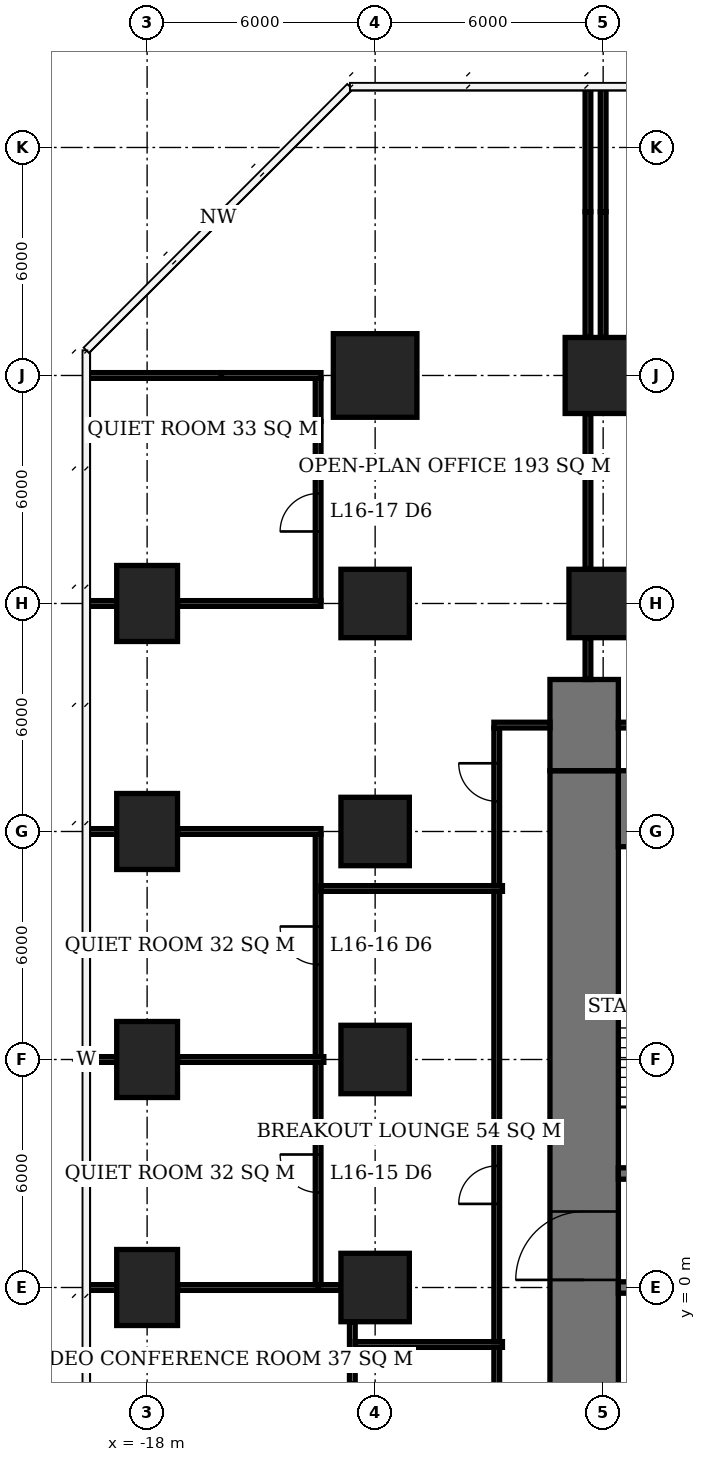
"""IFC4 building model, lengths in metres.
Left out: names, types, materials, properties, quantities, classifications, styles, units other than length and angle.
Written with IfcOpenShell. Run it as: python <this file> out.ifc"""

import sys

from ifc_helpers import new_model, si_unit, direction, frame, frame_2d, origin, origin_2d, place, context, subcontext, project, spatial, rectangle, extrude, element, fill, save


model = new_model("IFC4")
c1 = context("Model", 3, precision=1e-05, world=origin(), true_north=direction((0.0, 1.0)))
c2 = subcontext(c1, "Body", "Model", "MODEL_VIEW")
j1 = project(units=[si_unit("LENGTHUNIT", "METRE"), si_unit("PLANEANGLEUNIT", "RADIAN")], contexts=[c1])
p1 = place(None, origin())
s1 = spatial("IfcSite", under=j1, at=p1, CompositionType="ELEMENT")
p2 = place(p1, origin())
s2 = spatial("IfcBuilding", under=s1, at=p2, CompositionType="ELEMENT")
p3 = place(p2, frame((0.0, 0.0, 68.9)))
s3 = spatial("IfcBuildingStorey", under=s2, at=p3, CompositionType="ELEMENT", Elevation=68.9)
for number, where, z_axis, x_axis in (
    (1, (-18.0, 0.0, 0.0), (0.0, 0.0, 1.0), (0.0, 1.0, 0.0)),
    (2, (-18.0, 6.0, 0.0), (0.0, 0.0, 1.0), (0.0, 1.0, 0.0)),
    (3, (-18.0, 12.0, 0.0), (0.0, 0.0, 1.0), (0.0, 1.0, 0.0)),
    (4, (-18.0, 18.0, 0.0), (0.0, 0.0, 1.0), (0.0, 1.0, 0.0)),
):
    element("IfcColumn", number, at=place(p3, frame(where, z_axis=z_axis, x_axis=x_axis)), inside=s3, PredefinedType="COLUMN", context=c2, shape_type="SweptSolid", body=[
        extrude(rectangle(XDim=2.0, YDim=1.6, at=origin_2d()), origin(), (0.0, 0.0, 1.0), 3.9),
    ])
for number, where, z_axis, x_axis in (
    (5, (-12.0, 0.0, 0.0), (0.0, 0.0, 1.0), (1.0, 0.0, 0.0)),
    (6, (-12.0, 6.0, 0.0), (0.0, 0.0, 1.0), (1.0, 0.0, 0.0)),
    (7, (-12.0, 12.0, 0.0), (0.0, 0.0, 1.0), (1.0, 0.0, 0.0)),
    (8, (-12.0, 18.0, 0.0), (0.0, 0.0, 1.0), (1.0, 0.0, 0.0)),
):
    element("IfcColumn", number, at=place(p3, frame(where, z_axis=z_axis, x_axis=x_axis)), inside=s3, PredefinedType="COLUMN", context=c2, shape_type="SweptSolid", body=[
        extrude(rectangle(XDim=1.8, YDim=1.8, at=origin_2d()), origin(), (0.0, 0.0, 1.0), 3.9),
    ])
p4 = place(p3, frame((-12.0, 24.0, 0.0), z_axis=(0.0, 0.0, 1.0), x_axis=(1.0, 0.0, 0.0)))
e9 = element("IfcColumn", 9, at=p4, inside=s3, PredefinedType="COLUMN", context=c2, shape_type="SweptSolid", body=[
    extrude(rectangle(XDim=2.2, YDim=2.2, at=origin_2d()), origin(), (0.0, 0.0, 1.0), 3.9),
])
p5 = place(p3, frame((-6.0, 18.0, 0.0), z_axis=(0.0, 0.0, 1.0), x_axis=(1.0, 0.0, 0.0)))
e10 = element("IfcColumn", 10, at=p5, inside=s3, PredefinedType="COLUMN", context=c2, shape_type="SweptSolid", body=[
    extrude(rectangle(XDim=1.8, YDim=1.8, at=origin_2d()), origin(), (0.0, 0.0, 1.0), 3.9),
])
p6 = place(p3, frame((-6.0, 24.0, 0.0), z_axis=(0.0, 0.0, 1.0), x_axis=(1.0, 0.0, 0.0)))
e11 = element("IfcColumn", 11, at=p6, inside=s3, PredefinedType="COLUMN", context=c2, shape_type="SweptSolid", body=[
    extrude(rectangle(XDim=2.0, YDim=2.0, at=origin_2d()), origin(), (0.0, 0.0, 1.0), 3.9),
])
p7 = place(p3, frame((-5.6, 12.6, 0.0), z_axis=(0.0, 0.0, 1.0), x_axis=(1.0, 0.0, 0.0)))
e12 = element("IfcWall", 12, at=p7, inside=s3, PredefinedType="SHEAR", context=c2, shape_type="SweptSolid", body=[
    extrude(rectangle(XDim=23.2, YDim=2.0, at=frame_2d((11.6, 0.0))), origin(), (0.0, 0.0, 1.0), 3.9),
])
p8 = place(p3, frame((-6.5, -7.6, 0.0), z_axis=(0.0, 0.0, 1.0), x_axis=(0.0, 1.0, 0.0)))
e13 = element("IfcWall", 13, at=p8, inside=s3, PredefinedType="SHEAR", context=c2, shape_type="SweptSolid", body=[
    extrude(rectangle(XDim=21.2, YDim=1.8, at=frame_2d((10.6, 0.0))), origin(), (0.0, 0.0, 1.0), 3.9),
])
p9 = place(p8, frame((7.8, 0.0, 0.0)))
e14 = element("IfcOpeningElement", 14, at=p9, cuts=e13, PredefinedType="OPENING", context=c2, shape_type="SweptSolid", body=[
    extrude(rectangle(XDim=1.8, YDim=2.4, at=frame_2d((0.9, 1.2))), frame((0.0, 0.91, 0.0), z_axis=(0.0, -1.0, 0.0), x_axis=(1.0, 0.0, 0.0)), (0.0, 0.0, 1.0), 1.82),
])
p10 = place(p3, frame((-6.5, 13.6, 0.0), z_axis=(0.0, 0.0, 1.0), x_axis=(0.0, 1.0, 0.0)))
e15 = element("IfcWall", 15, at=p10, inside=s3, PredefinedType="SHEAR", context=c2, shape_type="SweptSolid", body=[
    extrude(rectangle(XDim=2.4, YDim=1.8, at=frame_2d((1.2, 0.0))), origin(), (0.0, 0.0, 1.0), 3.9),
])
p11 = place(p3, frame((-5.6, 0.0, 0.0), z_axis=(0.0, 0.0, 1.0), x_axis=(1.0, 0.0, 0.0)))
e16 = element("IfcWall", 16, at=p11, inside=s3, PredefinedType="SHEAR", context=c2, shape_type="SweptSolid", body=[
    extrude(rectangle(XDim=17.75, YDim=0.3, at=frame_2d((8.875, 0.0))), origin(), (0.0, 0.0, 1.0), 3.9),
])
p12 = place(p11, frame((0.6, 0.0, 0.0)))
e17 = element("IfcOpeningElement", 17, at=p12, cuts=e16, PredefinedType="OPENING", context=c2, shape_type="SweptSolid", body=[
    extrude(rectangle(XDim=0.9, YDim=2.1, at=frame_2d((0.45, 1.05))), frame((0.0, 0.16, 0.0), z_axis=(0.0, -1.0, 0.0), x_axis=(1.0, 0.0, 0.0)), (0.0, 0.0, 1.0), 0.32),
])
p13 = place(p11, frame((3.7, 0.0, 0.0)))
e18 = element("IfcOpeningElement", 18, at=p13, cuts=e16, PredefinedType="OPENING", context=c2, shape_type="SweptSolid", body=[
    extrude(rectangle(XDim=1.0, YDim=2.1, at=frame_2d((0.5, 1.05))), frame((0.0, 0.16, 0.0), z_axis=(0.0, -1.0, 0.0), x_axis=(1.0, 0.0, 0.0)), (0.0, 0.0, 1.0), 0.32),
])
p14 = place(p3, frame((-5.6, 3.0, 0.0), z_axis=(0.0, 0.0, 1.0), x_axis=(1.0, 0.0, 0.0)))
e19 = element("IfcWall", 19, at=p14, inside=s3, PredefinedType="SHEAR", context=c2, shape_type="SweptSolid", body=[
    extrude(rectangle(XDim=5.45, YDim=0.3, at=frame_2d((2.725, 0.0))), origin(), (0.0, 0.0, 1.0), 3.9),
])
p15 = place(p14, frame((0.4, 0.0, 0.0)))
e20 = element("IfcOpeningElement", 20, at=p15, cuts=e19, PredefinedType="OPENING", context=c2, shape_type="SweptSolid", body=[
    extrude(rectangle(XDim=1.2, YDim=2.1, at=frame_2d((0.6, 1.05))), frame((0.0, 0.16, 0.0), z_axis=(0.0, -1.0, 0.0), x_axis=(1.0, 0.0, 0.0)), (0.0, 0.0, 1.0), 0.32),
])
p16 = place(p14, frame((3.95, 0.0, 0.0)))
e21 = element("IfcOpeningElement", 21, at=p16, cuts=e19, PredefinedType="OPENING", context=c2, shape_type="SweptSolid", body=[
    extrude(rectangle(XDim=0.9, YDim=2.1, at=frame_2d((0.45, 1.05))), frame((0.0, 0.16, 0.0), z_axis=(0.0, -1.0, 0.0), x_axis=(1.0, 0.0, 0.0)), (0.0, 0.0, 1.0), 0.32),
])
p17 = place(p3, frame((-19.6, 0.0, 0.0), z_axis=(0.0, 0.0, 1.0), x_axis=(1.0, 0.0, 0.0)))
e22 = element("IfcWall", 22, at=p17, inside=s3, PredefinedType="PARTITIONING", context=c2, shape_type="SweptSolid", body=[
    extrude(rectangle(XDim=0.8, YDim=0.15, at=frame_2d((0.4, 0.0))), origin(), (0.0, 0.0, 1.0), 3.65),
])
p18 = place(p3, frame((-17.2, 0.0, 0.0), z_axis=(0.0, 0.0, 1.0), x_axis=(1.0, 0.0, 0.0)))
e23 = element("IfcWall", 23, at=p18, inside=s3, PredefinedType="PARTITIONING", context=c2, shape_type="SweptSolid", body=[
    extrude(rectangle(XDim=3.775, YDim=0.15, at=frame_2d((1.887, 0.0))), origin(), (0.0, 0.0, 1.0), 3.65),
])
p19 = place(p3, frame((-13.5, 0.0, 0.0), z_axis=(0.0, 0.0, 1.0), x_axis=(1.0, 0.0, 0.0)))
e24 = element("IfcWall", 24, at=p19, inside=s3, PredefinedType="PARTITIONING", context=c2, shape_type="SweptSolid", body=[
    extrude(rectangle(XDim=0.6, YDim=0.15, at=frame_2d((0.3, 0.0))), origin(), (0.0, 0.0, 1.0), 3.65),
])
p20 = place(p3, frame((-19.55, 6.0, 0.0), z_axis=(0.0, 0.0, 1.0), x_axis=(1.0, 0.0, 0.0)))
e25 = element("IfcWall", 25, at=p20, inside=s3, PredefinedType="PARTITIONING", context=c2, shape_type="SweptSolid", body=[
    extrude(rectangle(XDim=0.75, YDim=0.15, at=frame_2d((0.375, 0.0))), origin(), (0.0, 0.0, 1.0), 3.65),
])
p21 = place(p3, frame((-17.2, 6.0, 0.0), z_axis=(0.0, 0.0, 1.0), x_axis=(1.0, 0.0, 0.0)))
e26 = element("IfcWall", 26, at=p21, inside=s3, PredefinedType="PARTITIONING", context=c2, shape_type="SweptSolid", body=[
    extrude(rectangle(XDim=3.85, YDim=0.15, at=frame_2d((1.925, 0.0))), origin(), (0.0, 0.0, 1.0), 3.65),
])
p22 = place(p3, frame((-19.6, 12.0, 0.0), z_axis=(0.0, 0.0, 1.0), x_axis=(1.0, 0.0, 0.0)))
e27 = element("IfcWall", 27, at=p22, inside=s3, PredefinedType="PARTITIONING", context=c2, shape_type="SweptSolid", body=[
    extrude(rectangle(XDim=0.8, YDim=0.15, at=frame_2d((0.4, 0.0))), origin(), (0.0, 0.0, 1.0), 3.65),
])
p23 = place(p3, frame((-17.2, 12.0, 0.0), z_axis=(0.0, 0.0, 1.0), x_axis=(1.0, 0.0, 0.0)))
e28 = element("IfcWall", 28, at=p23, inside=s3, PredefinedType="PARTITIONING", context=c2, shape_type="SweptSolid", body=[
    extrude(rectangle(XDim=3.775, YDim=0.15, at=frame_2d((1.887, 0.0))), origin(), (0.0, 0.0, 1.0), 3.65),
])
p24 = place(p3, frame((-19.6, 18.0, 0.0), z_axis=(0.0, 0.0, 1.0), x_axis=(1.0, 0.0, 0.0)))
e29 = element("IfcWall", 29, at=p24, inside=s3, PredefinedType="PARTITIONING", context=c2, shape_type="SweptSolid", body=[
    extrude(rectangle(XDim=0.8, YDim=0.15, at=frame_2d((0.4, 0.0))), origin(), (0.0, 0.0, 1.0), 3.65),
])
p25 = place(p3, frame((-17.2, 18.0, 0.0), z_axis=(0.0, 0.0, 1.0), x_axis=(1.0, 0.0, 0.0)))
e30 = element("IfcWall", 30, at=p25, inside=s3, PredefinedType="PARTITIONING", context=c2, shape_type="SweptSolid", body=[
    extrude(rectangle(XDim=3.775, YDim=0.15, at=frame_2d((1.887, 0.0))), origin(), (0.0, 0.0, 1.0), 3.65),
])
p26 = place(p3, frame((-19.6, 24.0, 0.0), z_axis=(0.0, 0.0, 1.0), x_axis=(1.0, 0.0, 0.0)))
e31 = element("IfcWall", 31, at=p26, inside=s3, PredefinedType="PARTITIONING", context=c2, shape_type="SweptSolid", body=[
    extrude(rectangle(XDim=3.555, YDim=0.15, at=frame_2d((1.778, 0.0))), origin(), (0.0, 0.0, 1.0), 3.65),
])
p27 = place(p3, frame((-16.045, 24.0, 0.0), z_axis=(0.0, 0.0, 1.0), x_axis=(1.0, 0.0, 0.0)))
e32 = element("IfcWall", 32, at=p27, inside=s3, PredefinedType="PARTITIONING", context=c2, shape_type="SweptSolid", body=[
    extrude(rectangle(XDim=2.62, YDim=0.15, at=frame_2d((1.31, 0.0))), origin(), (0.0, 0.0, 1.0), 2.65),
])
p28 = place(p3, frame((-13.5, 0.075, 0.0), z_axis=(0.0, 0.0, 1.0), x_axis=(0.0, 1.0, 0.0)))
e33 = element("IfcWall", 33, at=p28, inside=s3, PredefinedType="PARTITIONING", context=c2, shape_type="SweptSolid", body=[
    extrude(rectangle(XDim=5.85, YDim=0.15, at=frame_2d((2.925, 0.0))), origin(), (0.0, 0.0, 1.0), 3.65),
])
p29 = place(p28, frame((2.425, 0.0, 0.0)))
e34 = element("IfcOpeningElement", 34, at=p29, cuts=e33, PredefinedType="OPENING", context=c2, shape_type="SweptSolid", body=[
    extrude(rectangle(XDim=1.0, YDim=2.1, at=frame_2d((0.5, 1.05))), frame((0.0, 0.085, 0.0), z_axis=(0.0, -1.0, 0.0), x_axis=(1.0, 0.0, 0.0)), (0.0, 0.0, 1.0), 0.17),
])
p30 = place(p3, frame((-13.5, 6.075, 0.0), z_axis=(0.0, 0.0, 1.0), x_axis=(0.0, 1.0, 0.0)))
e35 = element("IfcWall", 35, at=p30, inside=s3, PredefinedType="PARTITIONING", context=c2, shape_type="SweptSolid", body=[
    extrude(rectangle(XDim=5.85, YDim=0.15, at=frame_2d((2.925, 0.0))), origin(), (0.0, 0.0, 1.0), 3.65),
])
p31 = place(p30, frame((2.425, 0.0, 0.0)))
e36 = element("IfcOpeningElement", 36, at=p31, cuts=e35, PredefinedType="OPENING", context=c2, shape_type="SweptSolid", body=[
    extrude(rectangle(XDim=1.0, YDim=2.1, at=frame_2d((0.5, 1.05))), frame((0.0, 0.085, 0.0), z_axis=(0.0, -1.0, 0.0), x_axis=(1.0, 0.0, 0.0)), (0.0, 0.0, 1.0), 0.17),
])
p32 = place(p3, frame((-13.5, 18.075, 0.0), z_axis=(0.0, 0.0, 1.0), x_axis=(0.0, 1.0, 0.0)))
e37 = element("IfcWall", 37, at=p32, inside=s3, PredefinedType="PARTITIONING", context=c2, shape_type="SweptSolid", body=[
    extrude(rectangle(XDim=4.715, YDim=0.15, at=frame_2d((2.357, 0.0))), origin(), (0.0, 0.0, 1.0), 3.65),
])
p33 = place(p32, frame((1.82, 0.0, 0.0)))
e38 = element("IfcOpeningElement", 38, at=p33, cuts=e37, PredefinedType="OPENING", context=c2, shape_type="SweptSolid", body=[
    extrude(rectangle(XDim=1.0, YDim=2.1, at=frame_2d((0.5, 1.05))), frame((0.0, 0.085, 0.0), z_axis=(0.0, -1.0, 0.0), x_axis=(1.0, 0.0, 0.0)), (0.0, 0.0, 1.0), 0.17),
])
p34 = place(p3, frame((-13.5, 22.79, 0.0), z_axis=(0.0, 0.0, 1.0), x_axis=(0.0, 1.0, 0.0)))
e39 = element("IfcWall", 39, at=p34, inside=s3, PredefinedType="PARTITIONING", context=c2, shape_type="SweptSolid", body=[
    extrude(rectangle(XDim=1.135, YDim=0.15, at=frame_2d((0.567, 0.0))), origin(), (0.0, 0.0, 1.0), 2.65),
])
p35 = place(p3, frame((-12.6, -5.1, 0.0), z_axis=(0.0, 0.0, 1.0), x_axis=(0.0, 1.0, 0.0)))
e40 = element("IfcWall", 40, at=p35, inside=s3, PredefinedType="PARTITIONING", context=c2, shape_type="SweptSolid", body=[
    extrude(rectangle(XDim=4.2, YDim=0.15, at=frame_2d((2.1, 0.0))), origin(), (0.0, 0.0, 1.0), 3.65),
])
p36 = place(p35, frame((1.6, 0.0, 0.0)))
e41 = element("IfcOpeningElement", 41, at=p36, cuts=e40, PredefinedType="OPENING", context=c2, shape_type="SweptSolid", body=[
    extrude(rectangle(XDim=1.0, YDim=2.1, at=frame_2d((0.5, 1.05))), frame((0.0, 0.085, 0.0), z_axis=(0.0, -1.0, 0.0), x_axis=(1.0, 0.0, 0.0)), (0.0, 0.0, 1.0), 0.17),
])
p37 = place(p3, frame((-6.0, 25.0, 0.0), z_axis=(0.0, 0.0, 1.0), x_axis=(0.0, 1.0, 0.0)))
e42 = element("IfcWall", 42, at=p37, inside=s3, PredefinedType="PARTITIONING", context=c2, shape_type="SweptSolid", body=[
    extrude(rectangle(XDim=3.31, YDim=0.15, at=frame_2d((1.655, 0.0))), origin(), (0.0, 0.0, 1.0), 2.65),
])
p38 = place(p3, frame((-6.0, 28.31, 0.0), z_axis=(0.0, 0.0, 1.0), x_axis=(0.0, 1.0, 0.0)))
e43 = element("IfcWall", 43, at=p38, inside=s3, PredefinedType="PARTITIONING", context=c2, shape_type="SweptSolid", body=[
    extrude(rectangle(XDim=3.29, YDim=0.15, at=frame_2d((1.645, 0.0))), origin(), (0.0, 0.0, 1.0), 3.65),
])
p39 = place(p3, frame((-13.425, 10.5, 0.0), z_axis=(0.0, 0.0, 1.0), x_axis=(1.0, 0.0, 0.0)))
e44 = element("IfcWall", 44, at=p39, inside=s3, PredefinedType="PARTITIONING", context=c2, shape_type="SweptSolid", body=[
    extrude(rectangle(XDim=4.775, YDim=0.15, at=frame_2d((2.388, 0.0))), origin(), (0.0, 0.0, 1.0), 3.65),
])
p40 = place(p3, frame((-12.525, -1.5, 0.0), z_axis=(0.0, 0.0, 1.0), x_axis=(1.0, 0.0, 0.0)))
e45 = element("IfcWall", 45, at=p40, inside=s3, PredefinedType="PARTITIONING", context=c2, shape_type="SweptSolid", body=[
    extrude(rectangle(XDim=3.875, YDim=0.15, at=frame_2d((1.938, 0.0))), origin(), (0.0, 0.0, 1.0), 3.65),
])
p41 = place(p3, frame((-8.8, -8.725, 0.0), z_axis=(0.0, 0.0, 1.0), x_axis=(0.0, 1.0, 0.0)))
e46 = element("IfcWall", 46, at=p41, inside=s3, PredefinedType="PARTITIONING", context=c2, shape_type="SweptSolid", body=[
    extrude(rectangle(XDim=7.15, YDim=0.15, at=frame_2d((3.575, 0.0))), origin(), (0.0, 0.0, 1.0), 3.65),
])
p42 = place(p41, frame((1.98, 0.0, 0.0)))
e47 = element("IfcOpeningElement", 47, at=p42, cuts=e46, PredefinedType="OPENING", context=c2, shape_type="SweptSolid", body=[
    extrude(rectangle(XDim=1.0, YDim=2.1, at=frame_2d((0.5, 1.05))), frame((0.0, 0.085, 0.0), z_axis=(0.0, -1.0, 0.0), x_axis=(1.0, 0.0, 0.0)), (0.0, 0.0, 1.0), 0.17),
])
p43 = place(p3, frame((-8.8, -1.425, 0.0), z_axis=(0.0, 0.0, 1.0), x_axis=(0.0, 1.0, 0.0)))
e48 = element("IfcWall", 48, at=p43, inside=s3, PredefinedType="PARTITIONING", context=c2, shape_type="SweptSolid", body=[
    extrude(rectangle(XDim=11.85, YDim=0.15, at=frame_2d((5.925, 0.0))), origin(), (0.0, 0.0, 1.0), 3.65),
])
p44 = place(p43, frame((3.625, 0.0, 0.0)))
e49 = element("IfcOpeningElement", 49, at=p44, cuts=e48, PredefinedType="OPENING", context=c2, shape_type="SweptSolid", body=[
    extrude(rectangle(XDim=1.0, YDim=2.1, at=frame_2d((0.5, 1.05))), frame((0.0, 0.085, 0.0), z_axis=(0.0, -1.0, 0.0), x_axis=(1.0, 0.0, 0.0)), (0.0, 0.0, 1.0), 0.17),
])
p45 = place(p3, frame((-8.8, 10.575, 0.0), z_axis=(0.0, 0.0, 1.0), x_axis=(0.0, 1.0, 0.0)))
e50 = element("IfcWall", 50, at=p45, inside=s3, PredefinedType="PARTITIONING", context=c2, shape_type="SweptSolid", body=[
    extrude(rectangle(XDim=4.15, YDim=0.15, at=frame_2d((2.075, 0.0))), origin(), (0.0, 0.0, 1.0), 3.65),
])
p46 = place(p45, frame((2.22, 0.0, 0.0)))
e51 = element("IfcOpeningElement", 51, at=p46, cuts=e50, PredefinedType="OPENING", context=c2, shape_type="SweptSolid", body=[
    extrude(rectangle(XDim=1.0, YDim=2.1, at=frame_2d((0.5, 1.05))), frame((0.0, 0.085, 0.0), z_axis=(0.0, -1.0, 0.0), x_axis=(1.0, 0.0, 0.0)), (0.0, 0.0, 1.0), 0.17),
])
p47 = place(p3, frame((-8.875, 14.8, 0.0), z_axis=(0.0, 0.0, 1.0), x_axis=(1.0, 0.0, 0.0)))
e52 = element("IfcWall", 52, at=p47, inside=s3, PredefinedType="PARTITIONING", context=c2, shape_type="SweptSolid", body=[
    extrude(rectangle(XDim=1.475, YDim=0.15, at=frame_2d((0.738, 0.0))), origin(), (0.0, 0.0, 1.0), 3.65),
])
p48 = place(p3, frame((-6.4, 16.0, 0.0), z_axis=(0.0, 0.0, 1.0), x_axis=(0.0, 1.0, 0.0)))
e53 = element("IfcWall", 53, at=p48, inside=s3, PredefinedType="PARTITIONING", context=c2, shape_type="SweptSolid", body=[
    extrude(rectangle(XDim=1.1, YDim=0.15, at=frame_2d((0.55, 0.0))), origin(), (0.0, 0.0, 1.0), 3.65),
])
p49 = place(p3, frame((-6.4, 18.9, 0.0), z_axis=(0.0, 0.0, 1.0), x_axis=(0.0, 1.0, 0.0)))
e54 = element("IfcWall", 54, at=p49, inside=s3, PredefinedType="PARTITIONING", context=c2, shape_type="SweptSolid", body=[
    extrude(rectangle(XDim=4.1, YDim=0.15, at=frame_2d((2.05, 0.0))), origin(), (0.0, 0.0, 1.0), 3.65),
])
p50 = place(p3, frame((-6.4, 25.0, 0.0), z_axis=(0.0, 0.0, 1.0), x_axis=(0.0, 1.0, 0.0)))
e55 = element("IfcWall", 55, at=p50, inside=s3, PredefinedType="PARTITIONING", context=c2, shape_type="SweptSolid", body=[
    extrude(rectangle(XDim=3.31, YDim=0.15, at=frame_2d((1.655, 0.0))), origin(), (0.0, 0.0, 1.0), 2.65),
])
p51 = place(p3, frame((-6.4, 28.31, 0.0), z_axis=(0.0, 0.0, 1.0), x_axis=(0.0, 1.0, 0.0)))
e56 = element("IfcWall", 56, at=p51, inside=s3, PredefinedType="PARTITIONING", context=c2, shape_type="SweptSolid", body=[
    extrude(rectangle(XDim=3.24, YDim=0.15, at=frame_2d((1.62, 0.0))), origin(), (0.0, 0.0, 1.0), 3.65),
])
p52 = place(p3, frame((-5.6, 14.8, 0.0), z_axis=(0.0, 0.0, 1.0), x_axis=(1.0, 0.0, 0.0)))
e57 = element("IfcWall", 57, at=p52, inside=s3, PredefinedType="PARTITIONING", context=c2, shape_type="SweptSolid", body=[
    extrude(rectangle(XDim=10.025, YDim=0.15, at=frame_2d((5.013, 0.0))), origin(), (0.0, 0.0, 1.0), 3.65),
])
p53 = place(p52, frame((6.065, 0.0, 0.0)))
e58 = element("IfcOpeningElement", 58, at=p53, cuts=e57, PredefinedType="OPENING", context=c2, shape_type="SweptSolid", body=[
    extrude(rectangle(XDim=1.0, YDim=2.1, at=frame_2d((0.5, 1.05))), frame((0.0, 0.085, 0.0), z_axis=(0.0, -1.0, 0.0), x_axis=(1.0, 0.0, 0.0)), (0.0, 0.0, 1.0), 0.17),
])
p54 = place(p9, origin())
e59 = element("IfcDoor", 59, at=p54, inside=s3, OperationType="DOUBLE_DOOR_SINGLE_SWING", PredefinedType="DOOR", context=c2, shape_type="SweptSolid", body=[
    extrude(rectangle(XDim=1.8, YDim=2.4, at=frame_2d((0.9, 1.2))), frame((0.0, 0.025, 0.0), z_axis=(0.0, -1.0, 0.0), x_axis=(1.0, 0.0, 0.0)), (0.0, 0.0, 1.0), 0.05),
])
fill(e14, e59)
p55 = place(p29, origin())
e60 = element("IfcDoor", 60, at=p55, inside=s3, OperationType="SINGLE_SWING_RIGHT", PredefinedType="DOOR", context=c2, shape_type="SweptSolid", body=[
    extrude(rectangle(XDim=1.0, YDim=2.1, at=frame_2d((0.5, 1.05))), frame((0.0, 0.025, 0.0), z_axis=(0.0, -1.0, 0.0), x_axis=(1.0, 0.0, 0.0)), (0.0, 0.0, 1.0), 0.05),
])
fill(e34, e60)
p56 = place(p31, origin())
e61 = element("IfcDoor", 61, at=p56, inside=s3, OperationType="SINGLE_SWING_RIGHT", PredefinedType="DOOR", context=c2, shape_type="SweptSolid", body=[
    extrude(rectangle(XDim=1.0, YDim=2.1, at=frame_2d((0.5, 1.05))), frame((0.0, 0.025, 0.0), z_axis=(0.0, -1.0, 0.0), x_axis=(1.0, 0.0, 0.0)), (0.0, 0.0, 1.0), 0.05),
])
fill(e36, e61)
p57 = place(p33, origin())
e62 = element("IfcDoor", 62, at=p57, inside=s3, OperationType="SINGLE_SWING_LEFT", PredefinedType="DOOR", context=c2, shape_type="SweptSolid", body=[
    extrude(rectangle(XDim=1.0, YDim=2.1, at=frame_2d((0.5, 1.05))), frame((0.0, 0.025, 0.0), z_axis=(0.0, -1.0, 0.0), x_axis=(1.0, 0.0, 0.0)), (0.0, 0.0, 1.0), 0.05),
])
fill(e38, e62)
p58 = place(p44, origin())
e63 = element("IfcDoor", 63, at=p58, inside=s3, OperationType="SINGLE_SWING_LEFT", PredefinedType="DOOR", context=c2, shape_type="SweptSolid", body=[
    extrude(rectangle(XDim=1.0, YDim=2.1, at=frame_2d((0.5, 1.05))), frame((0.0, 0.025, 0.0), z_axis=(0.0, -1.0, 0.0), x_axis=(1.0, 0.0, 0.0)), (0.0, 0.0, 1.0), 0.05),
])
fill(e49, e63)
p59 = place(p46, origin())
e64 = element("IfcDoor", 64, at=p59, inside=s3, OperationType="SINGLE_SWING_RIGHT", PredefinedType="DOOR", context=c2, shape_type="SweptSolid", body=[
    extrude(rectangle(XDim=1.0, YDim=2.1, at=frame_2d((0.5, 1.05))), frame((0.0, 0.025, 0.0), z_axis=(0.0, -1.0, 0.0), x_axis=(1.0, 0.0, 0.0)), (0.0, 0.0, 1.0), 0.05),
])
fill(e51, e64)
save(model, sys.argv[1])
